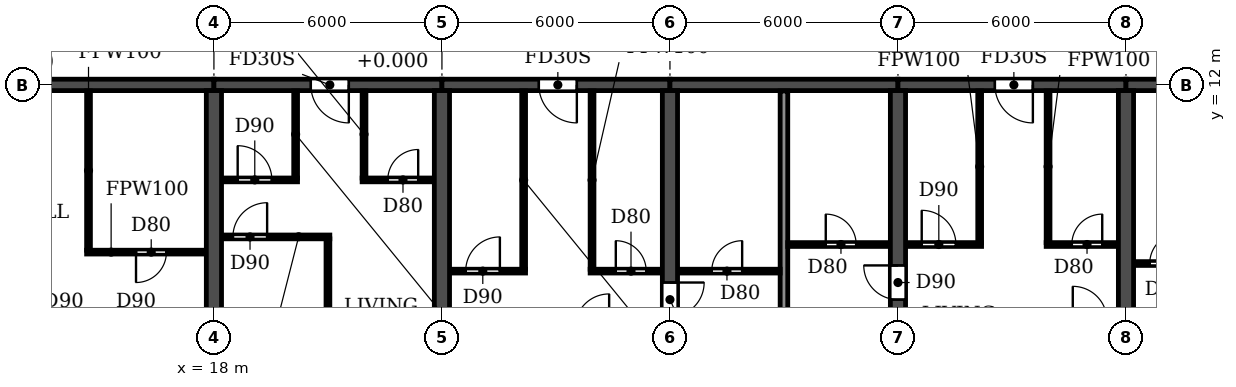
"""IFC4 building model, lengths in metres.
Left out: names, types, materials, properties, quantities, classifications, styles, units other than length and angle.
Written with IfcOpenShell. Run it as: python <this file> out.ifc"""

import sys

from ifc_helpers import new_model, si_unit, direction, frame, frame_2d, origin, place, context, subcontext, project, spatial, rectangle, extrude, element, fill, save


model = new_model("IFC4")
c1 = context("Model", 3, precision=1e-05, world=origin(), true_north=direction((0.0, 1.0)))
c2 = subcontext(c1, "Body", "Model", "MODEL_VIEW")
j1 = project(units=[si_unit("LENGTHUNIT", "METRE"), si_unit("PLANEANGLEUNIT", "RADIAN")], contexts=[c1])
p1 = place(None, origin())
s1 = spatial("IfcSite", under=j1, at=p1, CompositionType="ELEMENT")
p2 = place(p1, origin())
s2 = spatial("IfcBuilding", under=s1, at=p2, CompositionType="ELEMENT")
p3 = place(p2, frame((0.0, 0.0, 23.4)))
s3 = spatial("IfcBuildingStorey", under=s2, at=p3, CompositionType="ELEMENT", Elevation=23.4)
for number, where, z_axis, x_axis in (
    (1, (18.0, 0.2, 0.0), (0.0, 0.0, 1.0), (0.0, 1.0, 0.0)),
    (2, (24.0, 0.2, 0.0), (0.0, 0.0, 1.0), (0.0, 1.0, 0.0)),
):
    element("IfcWall", number, at=place(p3, frame(where, z_axis=z_axis, x_axis=x_axis)), inside=s3, PredefinedType="SHEAR", context=c2, shape_type="SweptSolid", body=[
        extrude(rectangle(XDim=11.65, YDim=0.4, at=frame_2d((5.825, 0.0))), origin(), (0.0, 0.0, 1.0), 3.05),
    ])
p4 = place(p3, frame((30.0, 0.2, 0.0), z_axis=(0.0, 0.0, 1.0), x_axis=(0.0, 1.0, 0.0)))
e3 = element("IfcWall", 3, at=p4, inside=s3, PredefinedType="SHEAR", context=c2, shape_type="SweptSolid", body=[
    extrude(rectangle(XDim=11.65, YDim=0.4, at=frame_2d((5.825, 0.0))), origin(), (0.0, 0.0, 1.0), 3.05),
])
p5 = place(p4, frame((5.7, 0.0, 0.0)))
e4 = element("IfcOpeningElement", 4, at=p5, cuts=e3, PredefinedType="OPENING", context=c2, shape_type="SweptSolid", body=[
    extrude(rectangle(XDim=0.9, YDim=2.1, at=frame_2d((0.45, 1.05))), frame((0.0, 0.21, 0.0), z_axis=(0.0, -1.0, 0.0), x_axis=(1.0, 0.0, 0.0)), (0.0, 0.0, 1.0), 0.42),
])
p6 = place(p3, frame((36.0, 0.2, 0.0), z_axis=(0.0, 0.0, 1.0), x_axis=(0.0, 1.0, 0.0)))
e5 = element("IfcWall", 5, at=p6, inside=s3, PredefinedType="SHEAR", context=c2, shape_type="SweptSolid", body=[
    extrude(rectangle(XDim=11.65, YDim=0.4, at=frame_2d((5.825, 0.0))), origin(), (0.0, 0.0, 1.0), 3.05),
])
p7 = place(p6, frame((6.15, 0.0, 0.0)))
e6 = element("IfcOpeningElement", 6, at=p7, cuts=e5, PredefinedType="OPENING", context=c2, shape_type="SweptSolid", body=[
    extrude(rectangle(XDim=0.9, YDim=2.1, at=frame_2d((0.45, 1.05))), frame((0.0, 0.21, 0.0), z_axis=(0.0, -1.0, 0.0), x_axis=(1.0, 0.0, 0.0)), (0.0, 0.0, 1.0), 0.42),
])
p8 = place(p3, frame((42.0, 0.2, 0.0), z_axis=(0.0, 0.0, 1.0), x_axis=(0.0, 1.0, 0.0)))
e7 = element("IfcWall", 7, at=p8, inside=s3, PredefinedType="SHEAR", context=c2, shape_type="SweptSolid", body=[
    extrude(rectangle(XDim=11.65, YDim=0.4, at=frame_2d((5.825, 0.0))), origin(), (0.0, 0.0, 1.0), 3.05),
])
p9 = place(p3, frame((12.0, 12.0, 0.0), z_axis=(0.0, 0.0, 1.0), x_axis=(1.0, 0.0, 0.0)))
e8 = element("IfcWall", 8, at=p9, inside=s3, PredefinedType="SHEAR", context=c2, shape_type="SweptSolid", body=[
    extrude(rectangle(XDim=6.0, YDim=0.3, at=frame_2d((3.0, 0.0))), origin(), (0.0, 0.0, 1.0), 2.45),
])
p10 = place(p3, frame((18.0, 12.0, 0.0), z_axis=(0.0, 0.0, 1.0), x_axis=(1.0, 0.0, 0.0)))
e9 = element("IfcWall", 9, at=p10, inside=s3, PredefinedType="SHEAR", context=c2, shape_type="SweptSolid", body=[
    extrude(rectangle(XDim=6.0, YDim=0.3, at=frame_2d((3.0, 0.0))), origin(), (0.0, 0.0, 1.0), 2.45),
])
p11 = place(p10, frame((2.55, 0.0, 0.0)))
e10 = element("IfcOpeningElement", 10, at=p11, cuts=e9, PredefinedType="OPENING", context=c2, shape_type="SweptSolid", body=[
    extrude(rectangle(XDim=1.0, YDim=2.1, at=frame_2d((0.5, 1.05))), frame((0.0, 0.16, 0.0), z_axis=(0.0, -1.0, 0.0), x_axis=(1.0, 0.0, 0.0)), (0.0, 0.0, 1.0), 0.32),
])
p12 = place(p3, frame((24.0, 12.0, 0.0), z_axis=(0.0, 0.0, 1.0), x_axis=(1.0, 0.0, 0.0)))
e11 = element("IfcWall", 11, at=p12, inside=s3, PredefinedType="SHEAR", context=c2, shape_type="SweptSolid", body=[
    extrude(rectangle(XDim=6.0, YDim=0.3, at=frame_2d((3.0, 0.0))), origin(), (0.0, 0.0, 1.0), 2.45),
])
p13 = place(p12, frame((2.55, 0.0, 0.0)))
e12 = element("IfcOpeningElement", 12, at=p13, cuts=e11, PredefinedType="OPENING", context=c2, shape_type="SweptSolid", body=[
    extrude(rectangle(XDim=1.0, YDim=2.1, at=frame_2d((0.5, 1.05))), frame((0.0, 0.16, 0.0), z_axis=(0.0, -1.0, 0.0), x_axis=(1.0, 0.0, 0.0)), (0.0, 0.0, 1.0), 0.32),
])
p14 = place(p3, frame((30.0, 12.0, 0.0), z_axis=(0.0, 0.0, 1.0), x_axis=(1.0, 0.0, 0.0)))
e13 = element("IfcWall", 13, at=p14, inside=s3, PredefinedType="SHEAR", context=c2, shape_type="SweptSolid", body=[
    extrude(rectangle(XDim=6.0, YDim=0.3, at=frame_2d((3.0, 0.0))), origin(), (0.0, 0.0, 1.0), 2.45),
])
p15 = place(p3, frame((36.0, 12.0, 0.0), z_axis=(0.0, 0.0, 1.0), x_axis=(1.0, 0.0, 0.0)))
e14 = element("IfcWall", 14, at=p15, inside=s3, PredefinedType="SHEAR", context=c2, shape_type="SweptSolid", body=[
    extrude(rectangle(XDim=6.0, YDim=0.3, at=frame_2d((3.0, 0.0))), origin(), (0.0, 0.0, 1.0), 2.45),
])
p16 = place(p15, frame((2.55, 0.0, 0.0)))
e15 = element("IfcOpeningElement", 15, at=p16, cuts=e14, PredefinedType="OPENING", context=c2, shape_type="SweptSolid", body=[
    extrude(rectangle(XDim=1.0, YDim=2.1, at=frame_2d((0.5, 1.05))), frame((0.0, 0.16, 0.0), z_axis=(0.0, -1.0, 0.0), x_axis=(1.0, 0.0, 0.0)), (0.0, 0.0, 1.0), 0.32),
])
p17 = place(p3, frame((42.0, 12.0, 0.0), z_axis=(0.0, 0.0, 1.0), x_axis=(1.0, 0.0, 0.0)))
e16 = element("IfcWall", 16, at=p17, inside=s3, PredefinedType="SHEAR", context=c2, shape_type="SweptSolid", body=[
    extrude(rectangle(XDim=6.0, YDim=0.3, at=frame_2d((3.0, 0.0))), origin(), (0.0, 0.0, 1.0), 2.45),
])
p18 = place(p17, frame((2.45, 0.0, 0.0)))
e17 = element("IfcOpeningElement", 17, at=p18, cuts=e16, PredefinedType="OPENING", context=c2, shape_type="SweptSolid", body=[
    extrude(rectangle(XDim=1.0, YDim=2.1, at=frame_2d((0.5, 1.05))), frame((0.0, 0.16, 0.0), z_axis=(0.0, -1.0, 0.0), x_axis=(1.0, 0.0, 0.0)), (0.0, 0.0, 1.0), 0.32),
])
p19 = place(p3, frame((33.0, 0.06, 0.0), z_axis=(0.0, 0.0, 1.0), x_axis=(0.0, 1.0, 0.0)))
e18 = element("IfcWall", 18, at=p19, inside=s3, PredefinedType="PARTITIONING", context=c2, shape_type="SweptSolid", body=[
    extrude(rectangle(XDim=11.78, YDim=0.2, at=frame_2d((5.89, 0.0))), origin(), (0.0, 0.0, 1.0), 3.05),
])
p20 = place(p3, frame((24.21, 7.1, 0.0), z_axis=(0.0, 0.0, 1.0), x_axis=(1.0, 0.0, 0.0)))
e19 = element("IfcWall", 19, at=p20, inside=s3, PredefinedType="PARTITIONING", context=c2, shape_type="SweptSolid", body=[
    extrude(rectangle(XDim=1.99, YDim=0.1, at=frame_2d((0.995, 0.0))), origin(), (0.0, 0.0, 1.0), 3.05),
])
p21 = place(p20, frame((0.415, 0.0, 0.0)))
e20 = element("IfcOpeningElement", 20, at=p21, cuts=e19, PredefinedType="OPENING", context=c2, shape_type="SweptSolid", body=[
    extrude(rectangle(XDim=0.9, YDim=2.1, at=frame_2d((0.45, 1.05))), frame((0.0, 0.06, 0.0), z_axis=(0.0, -1.0, 0.0), x_axis=(1.0, 0.0, 0.0)), (0.0, 0.0, 1.0), 0.12),
])
p22 = place(p3, frame((27.9, 7.1, 0.0), z_axis=(0.0, 0.0, 1.0), x_axis=(1.0, 0.0, 0.0)))
e21 = element("IfcWall", 21, at=p22, inside=s3, PredefinedType="PARTITIONING", context=c2, shape_type="SweptSolid", body=[
    extrude(rectangle(XDim=1.89, YDim=0.1, at=frame_2d((0.945, 0.0))), origin(), (0.0, 0.0, 1.0), 3.05),
])
p23 = place(p22, frame((0.675, 0.0, 0.0)))
e22 = element("IfcOpeningElement", 22, at=p23, cuts=e21, PredefinedType="OPENING", context=c2, shape_type="SweptSolid", body=[
    extrude(rectangle(XDim=0.8, YDim=2.1, at=frame_2d((0.4, 1.05))), frame((0.0, 0.06, 0.0), z_axis=(0.0, -1.0, 0.0), x_axis=(1.0, 0.0, 0.0)), (0.0, 0.0, 1.0), 0.12),
])
p24 = place(p3, frame((30.21, 7.1, 0.0), z_axis=(0.0, 0.0, 1.0), x_axis=(1.0, 0.0, 0.0)))
e23 = element("IfcWall", 23, at=p24, inside=s3, PredefinedType="PARTITIONING", context=c2, shape_type="SweptSolid", body=[
    extrude(rectangle(XDim=2.69, YDim=0.1, at=frame_2d((1.345, 0.0))), origin(), (0.0, 0.0, 1.0), 3.05),
])
p25 = place(p24, frame((0.89, 0.0, 0.0)))
e24 = element("IfcOpeningElement", 24, at=p25, cuts=e23, PredefinedType="OPENING", context=c2, shape_type="SweptSolid", body=[
    extrude(rectangle(XDim=0.8, YDim=2.1, at=frame_2d((0.4, 1.05))), frame((0.0, 0.06, 0.0), z_axis=(0.0, -1.0, 0.0), x_axis=(1.0, 0.0, 0.0)), (0.0, 0.0, 1.0), 0.12),
])
p26 = place(p3, frame((42.21, 7.3, 0.0), z_axis=(0.0, 0.0, 1.0), x_axis=(1.0, 0.0, 0.0)))
e25 = element("IfcWall", 25, at=p26, inside=s3, PredefinedType="PARTITIONING", context=c2, shape_type="SweptSolid", body=[
    extrude(rectangle(XDim=1.89, YDim=0.1, at=frame_2d((0.945, 0.0))), origin(), (0.0, 0.0, 1.0), 3.05),
])
p27 = place(p26, frame((0.415, 0.0, 0.0)))
e26 = element("IfcOpeningElement", 26, at=p27, cuts=e25, PredefinedType="OPENING", context=c2, shape_type="SweptSolid", body=[
    extrude(rectangle(XDim=0.8, YDim=2.1, at=frame_2d((0.4, 1.05))), frame((0.0, 0.06, 0.0), z_axis=(0.0, -1.0, 0.0), x_axis=(1.0, 0.0, 0.0)), (0.0, 0.0, 1.0), 0.12),
])
p28 = place(p3, frame((14.65, 7.6, 0.0), z_axis=(0.0, 0.0, 1.0), x_axis=(1.0, 0.0, 0.0)))
e27 = element("IfcWall", 27, at=p28, inside=s3, PredefinedType="PARTITIONING", context=c2, shape_type="SweptSolid", body=[
    extrude(rectangle(XDim=3.14, YDim=0.1, at=frame_2d((1.57, 0.0))), origin(), (0.0, 0.0, 1.0), 3.05),
])
p29 = place(p28, frame((1.3, 0.0, 0.0)))
e28 = element("IfcOpeningElement", 28, at=p29, cuts=e27, PredefinedType="OPENING", context=c2, shape_type="SweptSolid", body=[
    extrude(rectangle(XDim=0.8, YDim=2.1, at=frame_2d((0.4, 1.05))), frame((0.0, 0.06, 0.0), z_axis=(0.0, -1.0, 0.0), x_axis=(1.0, 0.0, 0.0)), (0.0, 0.0, 1.0), 0.12),
])
p30 = place(p3, frame((33.1, 7.8, 0.0), z_axis=(0.0, 0.0, 1.0), x_axis=(1.0, 0.0, 0.0)))
e29 = element("IfcWall", 29, at=p30, inside=s3, PredefinedType="PARTITIONING", context=c2, shape_type="SweptSolid", body=[
    extrude(rectangle(XDim=2.69, YDim=0.1, at=frame_2d((1.345, 0.0))), origin(), (0.0, 0.0, 1.0), 3.05),
])
p31 = place(p30, frame((1.0, 0.0, 0.0)))
e30 = element("IfcOpeningElement", 30, at=p31, cuts=e29, PredefinedType="OPENING", context=c2, shape_type="SweptSolid", body=[
    extrude(rectangle(XDim=0.8, YDim=2.1, at=frame_2d((0.4, 1.05))), frame((0.0, 0.06, 0.0), z_axis=(0.0, -1.0, 0.0), x_axis=(1.0, 0.0, 0.0)), (0.0, 0.0, 1.0), 0.12),
])
p32 = place(p3, frame((36.21, 7.8, 0.0), z_axis=(0.0, 0.0, 1.0), x_axis=(1.0, 0.0, 0.0)))
e31 = element("IfcWall", 31, at=p32, inside=s3, PredefinedType="PARTITIONING", context=c2, shape_type="SweptSolid", body=[
    extrude(rectangle(XDim=1.99, YDim=0.1, at=frame_2d((0.995, 0.0))), origin(), (0.0, 0.0, 1.0), 3.05),
])
p33 = place(p32, frame((0.415, 0.0, 0.0)))
e32 = element("IfcOpeningElement", 32, at=p33, cuts=e31, PredefinedType="OPENING", context=c2, shape_type="SweptSolid", body=[
    extrude(rectangle(XDim=0.9, YDim=2.1, at=frame_2d((0.45, 1.05))), frame((0.0, 0.06, 0.0), z_axis=(0.0, -1.0, 0.0), x_axis=(1.0, 0.0, 0.0)), (0.0, 0.0, 1.0), 0.12),
])
p34 = place(p3, frame((39.9, 7.8, 0.0), z_axis=(0.0, 0.0, 1.0), x_axis=(1.0, 0.0, 0.0)))
e33 = element("IfcWall", 33, at=p34, inside=s3, PredefinedType="PARTITIONING", context=c2, shape_type="SweptSolid", body=[
    extrude(rectangle(XDim=1.89, YDim=0.1, at=frame_2d((0.945, 0.0))), origin(), (0.0, 0.0, 1.0), 3.05),
])
p35 = place(p34, frame((0.675, 0.0, 0.0)))
e34 = element("IfcOpeningElement", 34, at=p35, cuts=e33, PredefinedType="OPENING", context=c2, shape_type="SweptSolid", body=[
    extrude(rectangle(XDim=0.8, YDim=2.1, at=frame_2d((0.4, 1.05))), frame((0.0, 0.06, 0.0), z_axis=(0.0, -1.0, 0.0), x_axis=(1.0, 0.0, 0.0)), (0.0, 0.0, 1.0), 0.12),
])
p36 = place(p3, frame((18.21, 8.0, 0.0), z_axis=(0.0, 0.0, 1.0), x_axis=(1.0, 0.0, 0.0)))
e35 = element("IfcWall", 35, at=p36, inside=s3, PredefinedType="PARTITIONING", context=c2, shape_type="SweptSolid", body=[
    extrude(rectangle(XDim=2.84, YDim=0.1, at=frame_2d((1.42, 0.0))), origin(), (0.0, 0.0, 1.0), 3.05),
])
p37 = place(p36, frame((0.29, 0.0, 0.0)))
e36 = element("IfcOpeningElement", 36, at=p37, cuts=e35, PredefinedType="OPENING", context=c2, shape_type="SweptSolid", body=[
    extrude(rectangle(XDim=0.9, YDim=2.1, at=frame_2d((0.45, 1.05))), frame((0.0, 0.06, 0.0), z_axis=(0.0, -1.0, 0.0), x_axis=(1.0, 0.0, 0.0)), (0.0, 0.0, 1.0), 0.12),
])
p38 = place(p3, frame((18.21, 9.5, 0.0), z_axis=(0.0, 0.0, 1.0), x_axis=(1.0, 0.0, 0.0)))
e37 = element("IfcWall", 37, at=p38, inside=s3, PredefinedType="PARTITIONING", context=c2, shape_type="SweptSolid", body=[
    extrude(rectangle(XDim=1.99, YDim=0.1, at=frame_2d((0.995, 0.0))), origin(), (0.0, 0.0, 1.0), 3.05),
])
p39 = place(p38, frame((0.415, 0.0, 0.0)))
e38 = element("IfcOpeningElement", 38, at=p39, cuts=e37, PredefinedType="OPENING", context=c2, shape_type="SweptSolid", body=[
    extrude(rectangle(XDim=0.9, YDim=2.1, at=frame_2d((0.45, 1.05))), frame((0.0, 0.06, 0.0), z_axis=(0.0, -1.0, 0.0), x_axis=(1.0, 0.0, 0.0)), (0.0, 0.0, 1.0), 0.12),
])
p40 = place(p3, frame((21.9, 9.5, 0.0), z_axis=(0.0, 0.0, 1.0), x_axis=(1.0, 0.0, 0.0)))
e39 = element("IfcWall", 39, at=p40, inside=s3, PredefinedType="PARTITIONING", context=c2, shape_type="SweptSolid", body=[
    extrude(rectangle(XDim=1.89, YDim=0.1, at=frame_2d((0.945, 0.0))), origin(), (0.0, 0.0, 1.0), 3.05),
])
p41 = place(p40, frame((0.675, 0.0, 0.0)))
e40 = element("IfcOpeningElement", 40, at=p41, cuts=e39, PredefinedType="OPENING", context=c2, shape_type="SweptSolid", body=[
    extrude(rectangle(XDim=0.8, YDim=2.1, at=frame_2d((0.4, 1.05))), frame((0.0, 0.06, 0.0), z_axis=(0.0, -1.0, 0.0), x_axis=(1.0, 0.0, 0.0)), (0.0, 0.0, 1.0), 0.12),
])
p42 = place(p3, frame((14.7, 7.65, 0.0), z_axis=(0.0, 0.0, 1.0), x_axis=(0.0, 1.0, 0.0)))
e41 = element("IfcWall", 41, at=p42, inside=s3, PredefinedType="PARTITIONING", context=c2, shape_type="SweptSolid", body=[
    extrude(rectangle(XDim=4.19, YDim=0.1, at=frame_2d((2.095, 0.0))), origin(), (0.0, 0.0, 1.0), 3.05),
])
p43 = place(p3, frame((20.15, 9.55, 0.0), z_axis=(0.0, 0.0, 1.0), x_axis=(0.0, 1.0, 0.0)))
e42 = element("IfcWall", 42, at=p43, inside=s3, PredefinedType="PARTITIONING", context=c2, shape_type="SweptSolid", body=[
    extrude(rectangle(XDim=2.29, YDim=0.1, at=frame_2d((1.145, 0.0))), origin(), (0.0, 0.0, 1.0), 3.05),
])
p44 = place(p3, frame((21.0, 0.06, 0.0), z_axis=(0.0, 0.0, 1.0), x_axis=(0.0, 1.0, 0.0)))
e43 = element("IfcWall", 43, at=p44, inside=s3, PredefinedType="PARTITIONING", context=c2, shape_type="SweptSolid", body=[
    extrude(rectangle(XDim=7.89, YDim=0.1, at=frame_2d((3.945, 0.0))), origin(), (0.0, 0.0, 1.0), 3.05),
])
p45 = place(p3, frame((21.95, 9.55, 0.0), z_axis=(0.0, 0.0, 1.0), x_axis=(0.0, 1.0, 0.0)))
e44 = element("IfcWall", 44, at=p45, inside=s3, PredefinedType="PARTITIONING", context=c2, shape_type="SweptSolid", body=[
    extrude(rectangle(XDim=2.29, YDim=0.1, at=frame_2d((1.145, 0.0))), origin(), (0.0, 0.0, 1.0), 3.05),
])
for number, where, z_axis, x_axis in (
    (45, (26.15, 7.15, 0.0), (0.0, 0.0, 1.0), (0.0, 1.0, 0.0)),
    (46, (27.95, 7.15, 0.0), (0.0, 0.0, 1.0), (0.0, 1.0, 0.0)),
):
    element("IfcWall", number, at=place(p3, frame(where, z_axis=z_axis, x_axis=x_axis)), inside=s3, PredefinedType="PARTITIONING", context=c2, shape_type="SweptSolid", body=[
        extrude(rectangle(XDim=4.69, YDim=0.1, at=frame_2d((2.345, 0.0))), origin(), (0.0, 0.0, 1.0), 3.05),
    ])
for number, where, z_axis, x_axis in (
    (47, (38.15, 7.85, 0.0), (0.0, 0.0, 1.0), (0.0, 1.0, 0.0)),
    (48, (39.95, 7.85, 0.0), (0.0, 0.0, 1.0), (0.0, 1.0, 0.0)),
):
    element("IfcWall", number, at=place(p3, frame(where, z_axis=z_axis, x_axis=x_axis)), inside=s3, PredefinedType="PARTITIONING", context=c2, shape_type="SweptSolid", body=[
        extrude(rectangle(XDim=3.99, YDim=0.1, at=frame_2d((1.995, 0.0))), origin(), (0.0, 0.0, 1.0), 3.05),
    ])
p46 = place(p29, frame((0.8, 0.0, 0.0), z_axis=(0.0, 0.0, 1.0), x_axis=(-1.0, 0.0, 0.0)))
e49 = element("IfcDoor", 49, at=p46, inside=s3, OperationType="SINGLE_SWING_RIGHT", PredefinedType="DOOR", context=c2, shape_type="SweptSolid", body=[
    extrude(rectangle(XDim=0.8, YDim=2.1, at=frame_2d((0.4, 1.05))), frame((0.0, 0.025, 0.0), z_axis=(0.0, -1.0, 0.0), x_axis=(1.0, 0.0, 0.0)), (0.0, 0.0, 1.0), 0.05),
])
fill(e28, e49)
p47 = place(p37, origin())
e50 = element("IfcDoor", 50, at=p47, inside=s3, OperationType="SINGLE_SWING_RIGHT", PredefinedType="DOOR", context=c2, shape_type="SweptSolid", body=[
    extrude(rectangle(XDim=0.9, YDim=2.1, at=frame_2d((0.45, 1.05))), frame((0.0, 0.025, 0.0), z_axis=(0.0, -1.0, 0.0), x_axis=(1.0, 0.0, 0.0)), (0.0, 0.0, 1.0), 0.05),
])
fill(e36, e50)
p48 = place(p39, origin())
e51 = element("IfcDoor", 51, at=p48, inside=s3, OperationType="SINGLE_SWING_LEFT", PredefinedType="DOOR", context=c2, shape_type="SweptSolid", body=[
    extrude(rectangle(XDim=0.9, YDim=2.1, at=frame_2d((0.45, 1.05))), frame((0.0, 0.025, 0.0), z_axis=(0.0, -1.0, 0.0), x_axis=(1.0, 0.0, 0.0)), (0.0, 0.0, 1.0), 0.05),
])
fill(e38, e51)
p49 = place(p11, frame((1.0, 0.0, 0.0), z_axis=(0.0, 0.0, 1.0), x_axis=(-1.0, 0.0, 0.0)))
e52 = element("IfcDoor", 52, at=p49, inside=s3, OperationType="SINGLE_SWING_LEFT", PredefinedType="DOOR", context=c2, shape_type="SweptSolid", body=[
    extrude(rectangle(XDim=1.0, YDim=2.1, at=frame_2d((0.5, 1.05))), frame((0.0, 0.025, 0.0), z_axis=(0.0, -1.0, 0.0), x_axis=(1.0, 0.0, 0.0)), (0.0, 0.0, 1.0), 0.05),
])
fill(e10, e52)
p50 = place(p41, origin())
e53 = element("IfcDoor", 53, at=p50, inside=s3, OperationType="SINGLE_SWING_RIGHT", PredefinedType="DOOR", context=c2, shape_type="SweptSolid", body=[
    extrude(rectangle(XDim=0.8, YDim=2.1, at=frame_2d((0.4, 1.05))), frame((0.0, 0.025, 0.0), z_axis=(0.0, -1.0, 0.0), x_axis=(1.0, 0.0, 0.0)), (0.0, 0.0, 1.0), 0.05),
])
fill(e40, e53)
p51 = place(p25, origin())
e54 = element("IfcDoor", 54, at=p51, inside=s3, OperationType="SINGLE_SWING_RIGHT", PredefinedType="DOOR", context=c2, shape_type="SweptSolid", body=[
    extrude(rectangle(XDim=0.8, YDim=2.1, at=frame_2d((0.4, 1.05))), frame((0.0, 0.025, 0.0), z_axis=(0.0, -1.0, 0.0), x_axis=(1.0, 0.0, 0.0)), (0.0, 0.0, 1.0), 0.05),
])
fill(e24, e54)
p52 = place(p21, origin())
e55 = element("IfcDoor", 55, at=p52, inside=s3, OperationType="SINGLE_SWING_RIGHT", PredefinedType="DOOR", context=c2, shape_type="SweptSolid", body=[
    extrude(rectangle(XDim=0.9, YDim=2.1, at=frame_2d((0.45, 1.05))), frame((0.0, 0.025, 0.0), z_axis=(0.0, -1.0, 0.0), x_axis=(1.0, 0.0, 0.0)), (0.0, 0.0, 1.0), 0.05),
])
fill(e20, e55)
p53 = place(p13, frame((1.0, 0.0, 0.0), z_axis=(0.0, 0.0, 1.0), x_axis=(-1.0, 0.0, 0.0)))
e56 = element("IfcDoor", 56, at=p53, inside=s3, OperationType="SINGLE_SWING_LEFT", PredefinedType="DOOR", context=c2, shape_type="SweptSolid", body=[
    extrude(rectangle(XDim=1.0, YDim=2.1, at=frame_2d((0.5, 1.05))), frame((0.0, 0.025, 0.0), z_axis=(0.0, -1.0, 0.0), x_axis=(1.0, 0.0, 0.0)), (0.0, 0.0, 1.0), 0.05),
])
fill(e12, e56)
p54 = place(p23, origin())
e57 = element("IfcDoor", 57, at=p54, inside=s3, OperationType="SINGLE_SWING_LEFT", PredefinedType="DOOR", context=c2, shape_type="SweptSolid", body=[
    extrude(rectangle(XDim=0.8, YDim=2.1, at=frame_2d((0.4, 1.05))), frame((0.0, 0.025, 0.0), z_axis=(0.0, -1.0, 0.0), x_axis=(1.0, 0.0, 0.0)), (0.0, 0.0, 1.0), 0.05),
])
fill(e22, e57)
p55 = place(p5, frame((0.9, 0.0, 0.0), z_axis=(0.0, 0.0, 1.0), x_axis=(-1.0, 0.0, 0.0)))
e58 = element("IfcDoor", 58, at=p55, inside=s3, OperationType="SINGLE_SWING_LEFT", PredefinedType="DOOR", context=c2, shape_type="SweptSolid", body=[
    extrude(rectangle(XDim=0.9, YDim=2.1, at=frame_2d((0.45, 1.05))), frame((0.0, 0.025, 0.0), z_axis=(0.0, -1.0, 0.0), x_axis=(1.0, 0.0, 0.0)), (0.0, 0.0, 1.0), 0.05),
])
fill(e4, e58)
p56 = place(p31, origin())
e59 = element("IfcDoor", 59, at=p56, inside=s3, OperationType="SINGLE_SWING_LEFT", PredefinedType="DOOR", context=c2, shape_type="SweptSolid", body=[
    extrude(rectangle(XDim=0.8, YDim=2.1, at=frame_2d((0.4, 1.05))), frame((0.0, 0.025, 0.0), z_axis=(0.0, -1.0, 0.0), x_axis=(1.0, 0.0, 0.0)), (0.0, 0.0, 1.0), 0.05),
])
fill(e30, e59)
p57 = place(p7, origin())
e60 = element("IfcDoor", 60, at=p57, inside=s3, OperationType="SINGLE_SWING_RIGHT", PredefinedType="DOOR", context=c2, shape_type="SweptSolid", body=[
    extrude(rectangle(XDim=0.9, YDim=2.1, at=frame_2d((0.45, 1.05))), frame((0.0, 0.025, 0.0), z_axis=(0.0, -1.0, 0.0), x_axis=(1.0, 0.0, 0.0)), (0.0, 0.0, 1.0), 0.05),
])
fill(e6, e60)
p58 = place(p33, origin())
e61 = element("IfcDoor", 61, at=p58, inside=s3, OperationType="SINGLE_SWING_LEFT", PredefinedType="DOOR", context=c2, shape_type="SweptSolid", body=[
    extrude(rectangle(XDim=0.9, YDim=2.1, at=frame_2d((0.45, 1.05))), frame((0.0, 0.025, 0.0), z_axis=(0.0, -1.0, 0.0), x_axis=(1.0, 0.0, 0.0)), (0.0, 0.0, 1.0), 0.05),
])
fill(e32, e61)
p59 = place(p16, frame((1.0, 0.0, 0.0), z_axis=(0.0, 0.0, 1.0), x_axis=(-1.0, 0.0, 0.0)))
e62 = element("IfcDoor", 62, at=p59, inside=s3, OperationType="SINGLE_SWING_LEFT", PredefinedType="DOOR", context=c2, shape_type="SweptSolid", body=[
    extrude(rectangle(XDim=1.0, YDim=2.1, at=frame_2d((0.5, 1.05))), frame((0.0, 0.025, 0.0), z_axis=(0.0, -1.0, 0.0), x_axis=(1.0, 0.0, 0.0)), (0.0, 0.0, 1.0), 0.05),
])
fill(e15, e62)
p60 = place(p35, origin())
e63 = element("IfcDoor", 63, at=p60, inside=s3, OperationType="SINGLE_SWING_RIGHT", PredefinedType="DOOR", context=c2, shape_type="SweptSolid", body=[
    extrude(rectangle(XDim=0.8, YDim=2.1, at=frame_2d((0.4, 1.05))), frame((0.0, 0.025, 0.0), z_axis=(0.0, -1.0, 0.0), x_axis=(1.0, 0.0, 0.0)), (0.0, 0.0, 1.0), 0.05),
])
fill(e34, e63)
p61 = place(p27, origin())
e64 = element("IfcDoor", 64, at=p61, inside=s3, OperationType="SINGLE_SWING_RIGHT", PredefinedType="DOOR", context=c2, shape_type="SweptSolid", body=[
    extrude(rectangle(XDim=0.8, YDim=2.1, at=frame_2d((0.4, 1.05))), frame((0.0, 0.025, 0.0), z_axis=(0.0, -1.0, 0.0), x_axis=(1.0, 0.0, 0.0)), (0.0, 0.0, 1.0), 0.05),
])
fill(e26, e64)
save(model, sys.argv[1])
